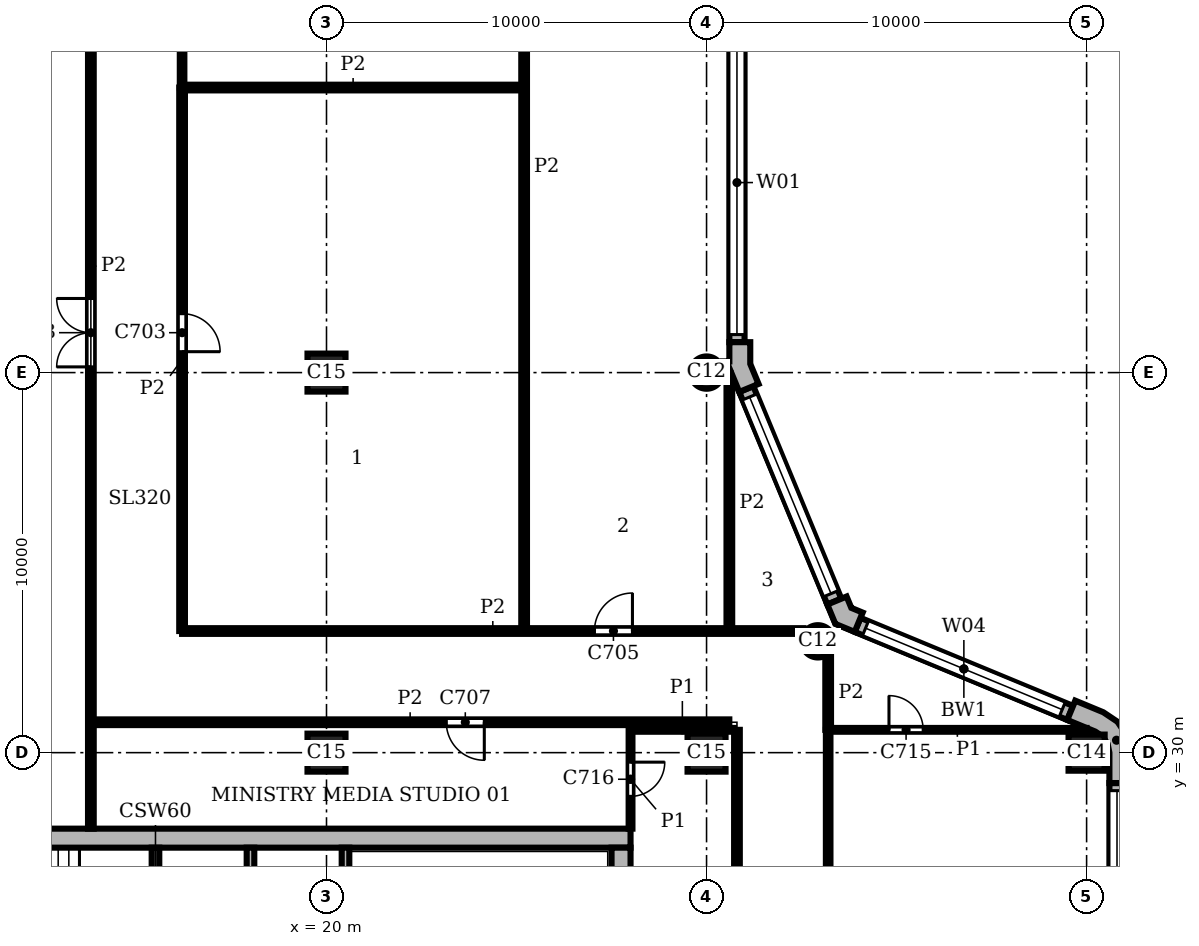
"""IFC4 building model, lengths in metres.
Left out: names, types, materials, properties, quantities, classifications, styles, units other than length and angle.
Written with IfcOpenShell. Run it as: python <this file> out.ifc"""

import sys

from ifc_helpers import new_model, si_unit, direction, frame, frame_2d, origin, origin_2d, place, context, subcontext, project, spatial, polyline, rectangle, circle, outline, extrude, element, fill, save


model = new_model("IFC4")
c1 = context("Model", 3, precision=1e-05, world=origin(), true_north=direction((0.0, 1.0)))
c2 = subcontext(c1, "Body", "Model", "MODEL_VIEW")
j1 = project(units=[si_unit("LENGTHUNIT", "METRE"), si_unit("PLANEANGLEUNIT", "RADIAN")], contexts=[c1])
p1 = place(None, origin())
s1 = spatial("IfcSite", under=j1, at=p1, CompositionType="ELEMENT")
p2 = place(p1, origin())
s2 = spatial("IfcBuilding", under=s1, at=p2, CompositionType="ELEMENT")
p3 = place(p2, frame((0.0, 0.0, 306.0)))
s3 = spatial("IfcBuildingStorey", under=s2, at=p3, CompositionType="ELEMENT", Elevation=306.0)
p4 = place(p3, frame((40.0, 30.0, 0.0), z_axis=(0.0, 0.0, 1.0), x_axis=(1.0, 0.0, 0.0)))
e1 = element("IfcColumn", 1, at=p4, inside=s3, PredefinedType="COLUMN", context=c2, shape_type="SweptSolid", body=[
    extrude(rectangle(XDim=0.95, YDim=0.95, at=origin_2d()), origin(), (0.0, 0.0, 1.0), 3.9),
])
for number, where, z_axis, x_axis in (
    (2, (32.929, 32.929, 0.0), (0.0, 0.0, 1.0), (1.0, 0.0, 0.0)),
    (3, (30.0, 40.0, 0.0), (0.0, 0.0, 1.0), (1.0, 0.0, 0.0)),
):
    element("IfcColumn", number, at=place(p3, frame(where, z_axis=z_axis, x_axis=x_axis)), inside=s3, PredefinedType="COLUMN", context=c2, shape_type="SweptSolid", body=[
        extrude(circle(Radius=0.425, at=origin_2d()), origin(), (0.0, 0.0, 1.0), 3.9),
    ])
for number, where, z_axis, x_axis in (
    (4, (20.0, 30.0, 0.0), (0.0, 0.0, 1.0), (1.0, 0.0, 0.0)),
    (5, (20.0, 40.0, 0.0), (0.0, 0.0, 1.0), (1.0, 0.0, 0.0)),
    (6, (30.0, 30.0, 0.0), (0.0, 0.0, 1.0), (1.0, 0.0, 0.0)),
):
    element("IfcColumn", number, at=place(p3, frame(where, z_axis=z_axis, x_axis=x_axis)), inside=s3, PredefinedType="COLUMN", context=c2, shape_type="SweptSolid", body=[
        extrude(rectangle(XDim=1.0, YDim=1.0, at=origin_2d()), origin(), (0.0, 0.0, 1.0), 3.9),
    ])
p5 = place(p3, frame((27.75, 8.5, 0.0), z_axis=(0.0, 0.0, 1.0), x_axis=(0.0, 1.0, 0.0)))
e7 = element("IfcWall", 7, at=p5, inside=s3, PredefinedType="SHEAR", context=c2, shape_type="SweptSolid", body=[
    extrude(rectangle(XDim=19.0, YDim=0.5, at=frame_2d((9.5, 0.0))), origin(), (0.0, 0.0, 1.0), 3.9),
])
p6 = place(p5, frame((4.95, 0.0, 0.0)))
e8 = element("IfcOpeningElement", 8, at=p6, cuts=e7, PredefinedType="OPENING", context=c2, shape_type="SweptSolid", body=[
    extrude(rectangle(XDim=1.6, YDim=2.1, at=frame_2d((0.8, 1.05))), frame((0.0, 0.26, 0.0), z_axis=(0.0, -1.0, 0.0), x_axis=(1.0, 0.0, 0.0)), (0.0, 0.0, 1.0), 0.52),
])
p7 = place(p3, frame((28.0, 27.75, 0.0), z_axis=(0.0, 0.0, 1.0), x_axis=(-1.0, 0.0, 0.0)))
e9 = element("IfcWall", 9, at=p7, inside=s3, PredefinedType="SHEAR", context=c2, shape_type="SweptSolid", body=[
    extrude(rectangle(XDim=20.0, YDim=0.5, at=frame_2d((10.0, 0.0))), origin(), (0.0, 0.0, 1.0), 3.9),
])
p8 = place(p3, origin())
e10 = element("IfcWall", 10, at=p8, inside=s3, PredefinedType="SOLIDWALL", context=c2, shape_type="SweptSolid", body=[
    extrude(outline(polyline([(41.0, 29.2), (41.15, 29.2), (41.15, 30.0), (41.062, 30.44), (40.813, 30.813), (40.44, 31.062), (39.701, 31.369), (39.644, 31.23), (39.49, 30.861), (40.229, 30.554), (40.424, 30.424), (40.554, 30.229), (40.6, 30.0), (40.6, 29.2), (41.0, 29.2)])), origin(), (0.0, 0.0, 1.0), 3.9),
])
e11 = element("IfcWall", 11, at=p8, inside=s3, PredefinedType="SOLIDWALL", context=c2, shape_type="SweptSolid", body=[
    extrude(outline(polyline([(34.051, 33.547), (34.108, 33.685), (33.809, 33.809), (33.685, 34.108), (33.547, 34.051), (33.177, 33.898), (33.388, 33.388), (33.898, 33.177), (34.051, 33.547)])), origin(), (0.0, 0.0, 1.0), 3.9),
])
e12 = element("IfcWall", 12, at=p8, inside=s3, PredefinedType="SOLIDWALL", context=c2, shape_type="SweptSolid", body=[
    extrude(outline(polyline([(30.62, 39.995), (30.62, 40.071), (30.861, 39.49), (31.23, 39.644), (31.369, 39.701), (31.15, 40.229), (31.15, 40.8), (31.0, 40.8), (30.6, 40.8), (30.6, 40.295), (30.425, 40.295), (30.425, 39.995), (30.62, 39.995)])), origin(), (0.0, 0.0, 1.0), 3.9),
])
p9 = place(p3, frame((40.8, 0.8, 0.0), z_axis=(0.0, 0.0, 1.0), x_axis=(0.0, 1.0, 0.0)))
e13 = element("IfcWall", 13, at=p9, inside=s3, PredefinedType="SOLIDWALL", context=c2, shape_type="SweptSolid", body=[
    extrude(rectangle(XDim=28.4, YDim=0.4, at=frame_2d((14.2, 0.0))), origin(), (0.0, 0.0, 1.0), 3.9),
])
p10 = place(p9, frame((0.2, 0.0, 0.9)))
e14 = element("IfcOpeningElement", 14, at=p10, cuts=e13, PredefinedType="OPENING", context=c2, shape_type="SweptSolid", body=[
    extrude(rectangle(XDim=8.0, YDim=2.35, at=frame_2d((4.0, 1.175))), frame((0.0, 0.21, 0.0), z_axis=(0.0, -1.0, 0.0), x_axis=(1.0, 0.0, 0.0)), (0.0, 0.0, 1.0), 0.42),
])
p11 = place(p9, frame((10.2, 0.0, 0.9)))
e15 = element("IfcOpeningElement", 15, at=p11, cuts=e13, PredefinedType="OPENING", context=c2, shape_type="SweptSolid", body=[
    extrude(rectangle(XDim=8.0, YDim=2.35, at=frame_2d((4.0, 1.175))), frame((0.0, 0.21, 0.0), z_axis=(0.0, -1.0, 0.0), x_axis=(1.0, 0.0, 0.0)), (0.0, 0.0, 1.0), 0.42),
])
p12 = place(p9, frame((20.2, 0.0, 0.9)))
e16 = element("IfcOpeningElement", 16, at=p12, cuts=e13, PredefinedType="OPENING", context=c2, shape_type="SweptSolid", body=[
    extrude(rectangle(XDim=8.0, YDim=2.35, at=frame_2d((4.0, 1.175))), frame((0.0, 0.21, 0.0), z_axis=(0.0, -1.0, 0.0), x_axis=(1.0, 0.0, 0.0)), (0.0, 0.0, 1.0), 0.42),
])
p13 = place(p3, frame((39.567, 31.045, 0.0), z_axis=(0.0, 0.0, 1.0), x_axis=(-0.923891000409, 0.382655745237, 0.0)))
e17 = element("IfcWall", 17, at=p13, inside=s3, PredefinedType="SOLIDWALL", context=c2, shape_type="SweptSolid", body=[
    extrude(rectangle(XDim=6.053, YDim=0.4, at=frame_2d((3.027, 0.0))), origin(), (0.0, 0.0, 1.0), 3.9),
])
p14 = place(p13, frame((0.227, 0.0, 0.9)))
e18 = element("IfcOpeningElement", 18, at=p14, cuts=e17, PredefinedType="OPENING", context=c2, shape_type="SweptSolid", body=[
    extrude(rectangle(XDim=5.6, YDim=2.35, at=frame_2d((2.8, 1.175))), frame((0.0, 0.21, 0.0), z_axis=(0.0, -1.0, 0.0), x_axis=(1.0, 0.0, 0.0)), (0.0, 0.0, 1.0), 0.42),
])
p15 = place(p3, frame((33.362, 33.974, 0.0), z_axis=(0.0, 0.0, 1.0), x_axis=(-0.382655745237, 0.923891000409, 0.0)))
e19 = element("IfcWall", 19, at=p15, inside=s3, PredefinedType="SOLIDWALL", context=c2, shape_type="SweptSolid", body=[
    extrude(rectangle(XDim=6.053, YDim=0.4, at=frame_2d((3.027, 0.0))), origin(), (0.0, 0.0, 1.0), 3.9),
])
p16 = place(p15, frame((0.227, 0.0, 0.9)))
e20 = element("IfcOpeningElement", 20, at=p16, cuts=e19, PredefinedType="OPENING", context=c2, shape_type="SweptSolid", body=[
    extrude(rectangle(XDim=5.6, YDim=2.35, at=frame_2d((2.8, 1.175))), frame((0.0, 0.21, 0.0), z_axis=(0.0, -1.0, 0.0), x_axis=(1.0, 0.0, 0.0)), (0.0, 0.0, 1.0), 0.42),
])
p17 = place(p3, frame((30.8, 40.8, 0.0), z_axis=(0.0, 0.0, 1.0), x_axis=(0.0, 1.0, 0.0)))
e21 = element("IfcWall", 21, at=p17, inside=s3, PredefinedType="SOLIDWALL", context=c2, shape_type="SweptSolid", body=[
    extrude(rectangle(XDim=18.4, YDim=0.4, at=frame_2d((9.2, 0.0))), origin(), (0.0, 0.0, 1.0), 3.9),
])
p18 = place(p17, frame((0.2, 0.0, 0.9)))
e22 = element("IfcOpeningElement", 22, at=p18, cuts=e21, PredefinedType="OPENING", context=c2, shape_type="SweptSolid", body=[
    extrude(rectangle(XDim=8.0, YDim=2.35, at=frame_2d((4.0, 1.175))), frame((0.0, 0.21, 0.0), z_axis=(0.0, -1.0, 0.0), x_axis=(1.0, 0.0, 0.0)), (0.0, 0.0, 1.0), 0.42),
])
p19 = place(p17, frame((10.2, 0.0, 0.9)))
e23 = element("IfcOpeningElement", 23, at=p19, cuts=e21, PredefinedType="OPENING", context=c2, shape_type="SweptSolid", body=[
    extrude(rectangle(XDim=8.0, YDim=2.35, at=frame_2d((4.0, 1.175))), frame((0.0, 0.21, 0.0), z_axis=(0.0, -1.0, 0.0), x_axis=(1.0, 0.0, 0.0)), (0.0, 0.0, 1.0), 0.42),
])
p20 = place(p3, frame((15.5, 23.6, 0.0), z_axis=(0.0, 0.0, 1.0), x_axis=(0.0, 1.0, 0.0)))
e24 = element("IfcWall", 24, at=p20, inside=s3, PredefinedType="SHEAR", context=c2, shape_type="SweptSolid", body=[
    extrude(rectangle(XDim=3.9, YDim=0.2, at=frame_2d((1.95, 0.0))), origin(), (0.0, 0.0, 1.0), 3.58),
])
p21 = place(p3, frame((18.0, 20.0, 0.0), z_axis=(0.0, 0.0, 1.0), x_axis=(0.0, 1.0, 0.0)))
e25 = element("IfcWall", 25, at=p21, inside=s3, PredefinedType="SHEAR", context=c2, shape_type="SweptSolid", body=[
    extrude(rectangle(XDim=7.5, YDim=0.2, at=frame_2d((3.75, 0.0))), origin(), (0.0, 0.0, 1.0), 3.58),
])
p22 = place(p21, frame((1.2, 0.0, 0.0)))
e26 = element("IfcOpeningElement", 26, at=p22, cuts=e25, PredefinedType="OPENING", context=c2, shape_type="SweptSolid", body=[
    extrude(rectangle(XDim=1.2, YDim=2.1, at=frame_2d((0.6, 1.05))), frame((0.0, 0.11, 0.0), z_axis=(0.0, -1.0, 0.0), x_axis=(1.0, 0.0, 0.0)), (0.0, 0.0, 1.0), 0.22),
])
p23 = place(p3, frame((20.5, 23.6, 0.0), z_axis=(0.0, 0.0, 1.0), x_axis=(0.0, 1.0, 0.0)))
e27 = element("IfcWall", 27, at=p23, inside=s3, PredefinedType="SHEAR", context=c2, shape_type="SweptSolid", body=[
    extrude(rectangle(XDim=3.9, YDim=0.2, at=frame_2d((1.95, 0.0))), origin(), (0.0, 0.0, 1.0), 3.58),
])
p24 = place(p3, frame((28.0, 28.0, 0.0), z_axis=(0.0, 0.0, 1.0), x_axis=(0.0, 1.0, 0.0)))
e28 = element("IfcWall", 28, at=p24, inside=s3, PredefinedType="PARTITIONING", context=c2, shape_type="SweptSolid", body=[
    extrude(rectangle(XDim=2.598, YDim=0.1, at=frame_2d((1.299, 0.0))), origin(), (0.0, 0.0, 1.0), 3.58),
])
p25 = place(p24, frame((0.85, 0.0, 0.0)))
e29 = element("IfcOpeningElement", 29, at=p25, cuts=e28, PredefinedType="OPENING", context=c2, shape_type="SweptSolid", body=[
    extrude(rectangle(XDim=0.9, YDim=2.1, at=frame_2d((0.45, 1.05))), frame((0.0, 0.06, 0.0), z_axis=(0.0, -1.0, 0.0), x_axis=(1.0, 0.0, 0.0)), (0.0, 0.0, 1.0), 0.12),
])
p26 = place(p3, frame((28.002, 30.6, 0.0), z_axis=(0.0, 0.0, 1.0), x_axis=(1.0, 0.0, 0.0)))
e30 = element("IfcWall", 30, at=p26, inside=s3, PredefinedType="PARTITIONING", context=c2, shape_type="SweptSolid", body=[
    extrude(rectangle(XDim=2.723, YDim=0.1, at=frame_2d((1.362, 0.0))), origin(), (0.0, 0.0, 1.0), 3.58),
])
p27 = place(p3, frame((33.2, 30.6, 0.0), z_axis=(0.0, 0.0, 1.0), x_axis=(1.0, 0.0, 0.0)))
e31 = element("IfcWall", 31, at=p27, inside=s3, PredefinedType="PARTITIONING", context=c2, shape_type="SweptSolid", body=[
    extrude(rectangle(XDim=6.799, YDim=0.1, at=frame_2d((3.399, 0.0))), origin(), (0.0, 0.0, 1.0), 3.58),
])
p28 = place(p27, frame((1.6, 0.0, 0.0)))
e32 = element("IfcOpeningElement", 32, at=p28, cuts=e31, PredefinedType="OPENING", context=c2, shape_type="SweptSolid", body=[
    extrude(rectangle(XDim=0.9, YDim=2.1, at=frame_2d((0.45, 1.05))), frame((0.0, 0.06, 0.0), z_axis=(0.0, -1.0, 0.0), x_axis=(1.0, 0.0, 0.0)), (0.0, 0.0, 1.0), 0.12),
])
p29 = place(p3, frame((13.8, 28.0, 0.0), z_axis=(0.0, 0.0, 1.0), x_axis=(0.0, 1.0, 0.0)))
e33 = element("IfcWall", 33, at=p29, inside=s3, PredefinedType="PARTITIONING", context=c2, shape_type="SweptSolid", body=[
    extrude(rectangle(XDim=29.6, YDim=0.15, at=frame_2d((14.8, 0.0))), origin(), (0.0, 0.0, 1.0), 3.58),
])
p30 = place(p29, frame((12.15, 0.0, 0.0)))
e34 = element("IfcOpeningElement", 34, at=p30, cuts=e33, PredefinedType="OPENING", context=c2, shape_type="SweptSolid", body=[
    extrude(rectangle(XDim=1.8, YDim=2.1, at=frame_2d((0.9, 1.05))), frame((0.0, 0.085, 0.0), z_axis=(0.0, -1.0, 0.0), x_axis=(1.0, 0.0, 0.0)), (0.0, 0.0, 1.0), 0.17),
])
p31 = place(p3, frame((16.2, 33.2, 0.0), z_axis=(0.0, 0.0, 1.0), x_axis=(0.0, 1.0, 0.0)))
e35 = element("IfcWall", 35, at=p31, inside=s3, PredefinedType="PARTITIONING", context=c2, shape_type="SweptSolid", body=[
    extrude(rectangle(XDim=14.3, YDim=0.15, at=frame_2d((7.15, 0.0))), origin(), (0.0, 0.0, 1.0), 3.58),
])
p32 = place(p31, frame((7.35, 0.0, 0.0)))
e36 = element("IfcOpeningElement", 36, at=p32, cuts=e35, PredefinedType="OPENING", context=c2, shape_type="SweptSolid", body=[
    extrude(rectangle(XDim=1.0, YDim=2.1, at=frame_2d((0.5, 1.05))), frame((0.0, 0.085, 0.0), z_axis=(0.0, -1.0, 0.0), x_axis=(1.0, 0.0, 0.0)), (0.0, 0.0, 1.0), 0.17),
])
p33 = place(p3, frame((25.2, 33.2, 0.0), z_axis=(0.0, 0.0, 1.0), x_axis=(0.0, 1.0, 0.0)))
e37 = element("IfcWall", 37, at=p33, inside=s3, PredefinedType="PARTITIONING", context=c2, shape_type="SweptSolid", body=[
    extrude(rectangle(XDim=24.4, YDim=0.15, at=frame_2d((12.2, 0.0))), origin(), (0.0, 0.0, 1.0), 3.58),
])
p34 = place(p3, frame((30.6, 33.2, 0.0), z_axis=(0.0, 0.0, 1.0), x_axis=(0.0, 1.0, 0.0)))
e38 = element("IfcWall", 38, at=p34, inside=s3, PredefinedType="PARTITIONING", context=c2, shape_type="SweptSolid", body=[
    extrude(rectangle(XDim=6.738, YDim=0.15, at=frame_2d((3.369, 0.0))), origin(), (0.0, 0.0, 1.0), 3.58),
])
p35 = place(p3, frame((30.8, 15.45, 0.0), z_axis=(0.0, 0.0, 1.0), x_axis=(0.0, 1.0, 0.0)))
e39 = element("IfcWall", 39, at=p35, inside=s3, PredefinedType="PARTITIONING", context=c2, shape_type="SweptSolid", body=[
    extrude(rectangle(XDim=15.15, YDim=0.15, at=frame_2d((7.575, 0.0))), origin(), (0.0, 0.0, 1.0), 3.58),
])
p36 = place(p35, frame((5.35, 0.0, 0.0)))
e40 = element("IfcOpeningElement", 40, at=p36, cuts=e39, PredefinedType="OPENING", context=c2, shape_type="SweptSolid", body=[
    extrude(rectangle(XDim=1.0, YDim=2.1, at=frame_2d((0.5, 1.05))), frame((0.0, 0.085, 0.0), z_axis=(0.0, -1.0, 0.0), x_axis=(1.0, 0.0, 0.0)), (0.0, 0.0, 1.0), 0.17),
])
p37 = place(p3, frame((33.2, 30.6, 0.0), z_axis=(0.0, 0.0, 1.0), x_axis=(0.0, 1.0, 0.0)))
e41 = element("IfcWall", 41, at=p37, inside=s3, PredefinedType="PARTITIONING", context=c2, shape_type="SweptSolid", body=[
    extrude(rectangle(XDim=1.952, YDim=0.15, at=frame_2d((0.976, 0.0))), origin(), (0.0, 0.0, 1.0), 3.58),
])
p38 = place(p3, frame((13.802, 30.8, 0.0), z_axis=(0.0, 0.0, 1.0), x_axis=(1.0, 0.0, 0.0)))
e42 = element("IfcWall", 42, at=p38, inside=s3, PredefinedType="PARTITIONING", context=c2, shape_type="SweptSolid", body=[
    extrude(rectangle(XDim=16.797, YDim=0.15, at=frame_2d((8.398, 0.0))), origin(), (0.0, 0.0, 1.0), 3.58),
])
p39 = place(p38, frame((9.35, 0.0, 0.0)))
e43 = element("IfcOpeningElement", 43, at=p39, cuts=e42, PredefinedType="OPENING", context=c2, shape_type="SweptSolid", body=[
    extrude(rectangle(XDim=1.0, YDim=2.1, at=frame_2d((0.5, 1.05))), frame((0.0, 0.085, 0.0), z_axis=(0.0, -1.0, 0.0), x_axis=(1.0, 0.0, 0.0)), (0.0, 0.0, 1.0), 0.17),
])
p40 = place(p3, frame((16.2, 33.2, 0.0), z_axis=(0.0, 0.0, 1.0), x_axis=(1.0, 0.0, 0.0)))
e44 = element("IfcWall", 44, at=p40, inside=s3, PredefinedType="PARTITIONING", context=c2, shape_type="SweptSolid", body=[
    extrude(rectangle(XDim=16.352, YDim=0.15, at=frame_2d((8.176, 0.0))), origin(), (0.0, 0.0, 1.0), 3.58),
])
p41 = place(p40, frame((10.85, 0.0, 0.0)))
e45 = element("IfcOpeningElement", 45, at=p41, cuts=e44, PredefinedType="OPENING", context=c2, shape_type="SweptSolid", body=[
    extrude(rectangle(XDim=1.0, YDim=2.1, at=frame_2d((0.5, 1.05))), frame((0.0, 0.085, 0.0), z_axis=(0.0, -1.0, 0.0), x_axis=(1.0, 0.0, 0.0)), (0.0, 0.0, 1.0), 0.17),
])
p42 = place(p3, frame((16.2, 47.5, 0.0), z_axis=(0.0, 0.0, 1.0), x_axis=(1.0, 0.0, 0.0)))
e46 = element("IfcWall", 46, at=p42, inside=s3, PredefinedType="PARTITIONING", context=c2, shape_type="SweptSolid", body=[
    extrude(rectangle(XDim=9.0, YDim=0.15, at=frame_2d((4.5, 0.0))), origin(), (0.0, 0.0, 1.0), 3.58),
])
p43 = place(p3, frame((16.2, 47.5, 0.0), z_axis=(0.0, 0.0, 1.0), x_axis=(0.0, 1.0, 0.0)))
e47 = element("IfcWall", 47, at=p43, inside=s3, PredefinedType="PARTITIONING", context=c2, shape_type="SweptSolid", body=[
    extrude(rectangle(XDim=10.1, YDim=0.12, at=frame_2d((5.05, 0.0))), origin(), (0.0, 0.0, 1.0), 3.58),
])
p44 = place(p43, frame((3.35, 0.0, 0.0)))
e48 = element("IfcOpeningElement", 48, at=p44, cuts=e47, PredefinedType="OPENING", context=c2, shape_type="SweptSolid", body=[
    extrude(rectangle(XDim=1.8, YDim=2.1, at=frame_2d((0.9, 1.05))), frame((0.0, 0.07, 0.0), z_axis=(0.0, -1.0, 0.0), x_axis=(1.0, 0.0, 0.0)), (0.0, 0.0, 1.0), 0.14),
])
p45 = place(p3, frame((33.2, 8.0, 0.0), z_axis=(0.0, 0.0, 1.0), x_axis=(0.0, 1.0, 0.0)))
e49 = element("IfcWall", 49, at=p45, inside=s3, PredefinedType="PARTITIONING", context=c2, shape_type="SweptSolid", body=[
    extrude(rectangle(XDim=22.6, YDim=0.12, at=frame_2d((11.3, 0.0))), origin(), (0.0, 0.0, 1.0), 3.58),
])
p46 = place(p45, frame((8.6, 0.0, 0.0)))
e50 = element("IfcOpeningElement", 50, at=p46, cuts=e49, PredefinedType="OPENING", context=c2, shape_type="SweptSolid", body=[
    extrude(rectangle(XDim=1.8, YDim=2.1, at=frame_2d((0.9, 1.05))), frame((0.0, 0.07, 0.0), z_axis=(0.0, -1.0, 0.0), x_axis=(1.0, 0.0, 0.0)), (0.0, 0.0, 1.0), 0.14),
])
p47 = place(p12, origin())
e51 = element("IfcWindow", 51, at=p47, inside=s3, PartitioningType="SINGLE_PANEL", PredefinedType="WINDOW", context=c2, shape_type="SweptSolid", body=[
    extrude(rectangle(XDim=8.0, YDim=2.35, at=frame_2d((4.0, 1.175))), frame((0.0, 0.16, 0.0), z_axis=(0.0, -1.0, 0.0), x_axis=(1.0, 0.0, 0.0)), (0.0, 0.0, 1.0), 0.06),
])
fill(e16, e51)
p48 = place(p14, origin())
e52 = element("IfcWindow", 52, at=p48, inside=s3, PartitioningType="SINGLE_PANEL", PredefinedType="WINDOW", context=c2, shape_type="SweptSolid", body=[
    extrude(rectangle(XDim=5.6, YDim=2.35, at=frame_2d((2.8, 1.175))), frame((0.0, 0.16, 0.0), z_axis=(0.0, -1.0, 0.0), x_axis=(1.0, 0.0, 0.0)), (0.0, 0.0, 1.0), 0.06),
])
fill(e18, e52)
p49 = place(p16, origin())
e53 = element("IfcWindow", 53, at=p49, inside=s3, PartitioningType="SINGLE_PANEL", PredefinedType="WINDOW", context=c2, shape_type="SweptSolid", body=[
    extrude(rectangle(XDim=5.6, YDim=2.35, at=frame_2d((2.8, 1.175))), frame((0.0, 0.16, 0.0), z_axis=(0.0, -1.0, 0.0), x_axis=(1.0, 0.0, 0.0)), (0.0, 0.0, 1.0), 0.06),
])
fill(e20, e53)
p50 = place(p18, origin())
e54 = element("IfcWindow", 54, at=p50, inside=s3, PartitioningType="SINGLE_PANEL", PredefinedType="WINDOW", context=c2, shape_type="SweptSolid", body=[
    extrude(rectangle(XDim=8.0, YDim=2.35, at=frame_2d((4.0, 1.175))), frame((0.0, 0.16, 0.0), z_axis=(0.0, -1.0, 0.0), x_axis=(1.0, 0.0, 0.0)), (0.0, 0.0, 1.0), 0.06),
])
fill(e22, e54)
p51 = place(p32, frame((1.0, 0.0, 0.0), z_axis=(0.0, 0.0, 1.0), x_axis=(-1.0, 0.0, 0.0)))
e55 = element("IfcDoor", 55, at=p51, inside=s3, OperationType="SINGLE_SWING_RIGHT", PredefinedType="DOOR", context=c2, shape_type="SweptSolid", body=[
    extrude(rectangle(XDim=1.0, YDim=2.1, at=frame_2d((0.5, 1.05))), frame((0.0, 0.025, 0.0), z_axis=(0.0, -1.0, 0.0), x_axis=(1.0, 0.0, 0.0)), (0.0, 0.0, 1.0), 0.05),
])
fill(e36, e55)
p52 = place(p41, origin())
e56 = element("IfcDoor", 56, at=p52, inside=s3, OperationType="SINGLE_SWING_RIGHT", PredefinedType="DOOR", context=c2, shape_type="SweptSolid", body=[
    extrude(rectangle(XDim=1.0, YDim=2.1, at=frame_2d((0.5, 1.05))), frame((0.0, 0.025, 0.0), z_axis=(0.0, -1.0, 0.0), x_axis=(1.0, 0.0, 0.0)), (0.0, 0.0, 1.0), 0.05),
])
fill(e45, e56)
p53 = place(p39, frame((1.0, 0.0, 0.0), z_axis=(0.0, 0.0, 1.0), x_axis=(-1.0, 0.0, 0.0)))
e57 = element("IfcDoor", 57, at=p53, inside=s3, OperationType="SINGLE_SWING_LEFT", PredefinedType="DOOR", context=c2, shape_type="SweptSolid", body=[
    extrude(rectangle(XDim=1.0, YDim=2.1, at=frame_2d((0.5, 1.05))), frame((0.0, 0.025, 0.0), z_axis=(0.0, -1.0, 0.0), x_axis=(1.0, 0.0, 0.0)), (0.0, 0.0, 1.0), 0.05),
])
fill(e43, e57)
p54 = place(p30, origin())
e58 = element("IfcDoor", 58, at=p54, inside=s3, OperationType="DOUBLE_DOOR_SINGLE_SWING", PredefinedType="DOOR", context=c2, shape_type="SweptSolid", body=[
    extrude(rectangle(XDim=1.8, YDim=2.1, at=frame_2d((0.9, 1.05))), frame((0.0, 0.025, 0.0), z_axis=(0.0, -1.0, 0.0), x_axis=(1.0, 0.0, 0.0)), (0.0, 0.0, 1.0), 0.05),
])
fill(e34, e58)
p55 = place(p28, origin())
e59 = element("IfcDoor", 59, at=p55, inside=s3, OperationType="SINGLE_SWING_LEFT", PredefinedType="DOOR", context=c2, shape_type="SweptSolid", body=[
    extrude(rectangle(XDim=0.9, YDim=2.1, at=frame_2d((0.45, 1.05))), frame((0.0, 0.025, 0.0), z_axis=(0.0, -1.0, 0.0), x_axis=(1.0, 0.0, 0.0)), (0.0, 0.0, 1.0), 0.05),
])
fill(e32, e59)
p56 = place(p25, frame((0.9, 0.0, 0.0), z_axis=(0.0, 0.0, 1.0), x_axis=(-1.0, 0.0, 0.0)))
e60 = element("IfcDoor", 60, at=p56, inside=s3, OperationType="SINGLE_SWING_LEFT", PredefinedType="DOOR", context=c2, shape_type="SweptSolid", body=[
    extrude(rectangle(XDim=0.9, YDim=2.1, at=frame_2d((0.45, 1.05))), frame((0.0, 0.025, 0.0), z_axis=(0.0, -1.0, 0.0), x_axis=(1.0, 0.0, 0.0)), (0.0, 0.0, 1.0), 0.05),
])
fill(e29, e60)
save(model, sys.argv[1])
